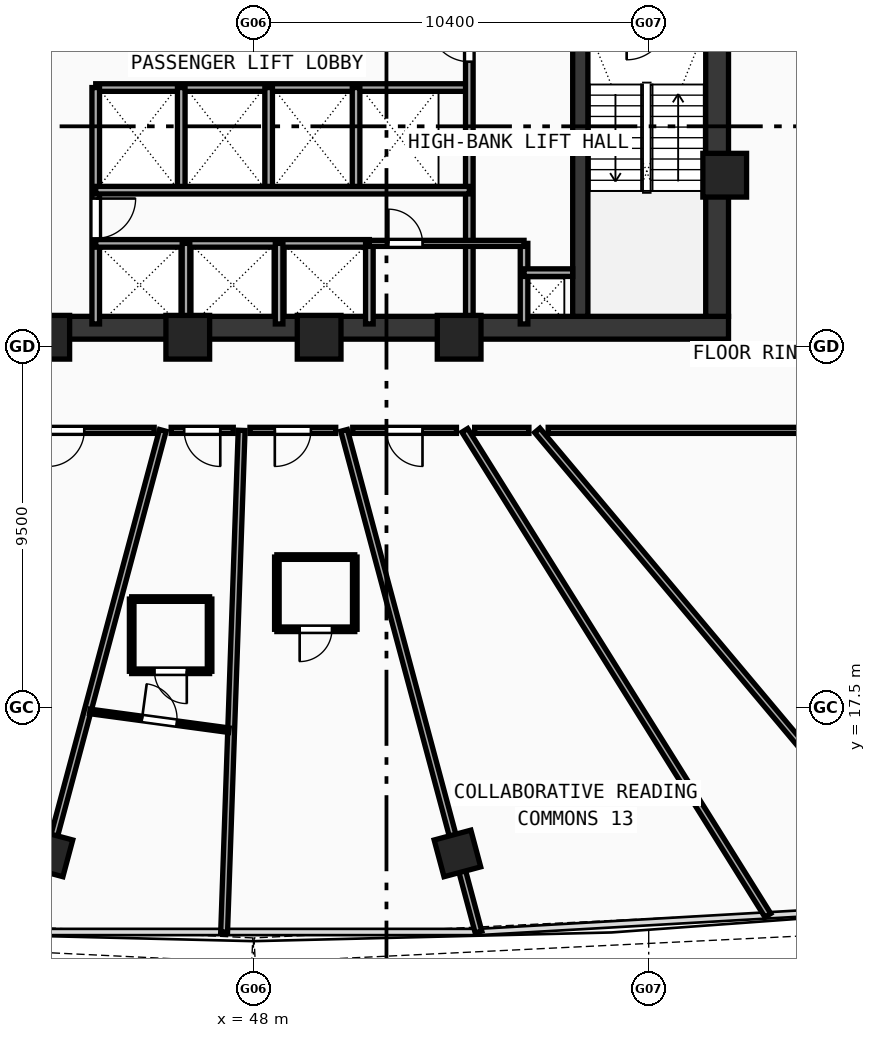
"""IFC4 building model, lengths in metres.
Left out: names, types, materials, properties, quantities, classifications, styles, units other than length and angle.
Written with IfcOpenShell. Run it as: python <this file> out.ifc"""

import sys

from ifc_helpers import new_model, si_unit, direction, frame, frame_2d, origin, origin_with_axes, origin_2d, place, context, subcontext, project, spatial, rectangle, hollow_rectangle, extrude, source, transform, mapped, element, fill, save


model = new_model("IFC4")
c1 = context("Model", 3, precision=1e-05, world=origin(), true_north=direction((0.0, 1.0)))
c2 = subcontext(c1, "Body", "Model", "MODEL_VIEW")
j1 = project(units=[si_unit("LENGTHUNIT", "METRE"), si_unit("PLANEANGLEUNIT", "RADIAN")], contexts=[c1])
p1 = place(None, origin())
s1 = spatial("IfcSite", under=j1, at=p1, CompositionType="ELEMENT")
p2 = place(p1, origin())
s2 = spatial("IfcBuilding", under=s1, at=p2, CompositionType="ELEMENT")
p3 = place(p2, frame((0.0, 0.0, 88.78)))
s3 = spatial("IfcBuildingStorey", under=s2, at=p3, CompositionType="ELEMENT", Elevation=88.78)
p4 = place(p3, frame((35.5, 27.5, 0.0), z_axis=(0.0, 0.0, 1.0), x_axis=(1.0, 0.0, 0.0)))
e1 = element("IfcWall", 1, at=p4, inside=s3, PredefinedType="SHEAR", context=c2, shape_type="SweptSolid", body=[
    extrude(rectangle(XDim=25.0, YDim=0.6, at=frame_2d((12.5, 0.0))), origin(), (0.0, 0.0, 1.0), 3.54),
])
p5 = place(p3, frame((60.2, 27.8, 0.0), z_axis=(0.0, 0.0, 1.0), x_axis=(0.0, 1.0, 0.0)))
e2 = element("IfcWall", 2, at=p5, inside=s3, PredefinedType="SHEAR", context=c2, shape_type="SweptSolid", body=[
    extrude(rectangle(XDim=12.1, YDim=0.6, at=frame_2d((6.05, 0.0))), origin(), (0.0, 0.0, 1.0), 3.54),
])
p6 = place(p3, frame((56.6, 27.8, 0.0), z_axis=(0.0, 0.0, 1.0), x_axis=(0.0, 1.0, 0.0)))
e3 = element("IfcWall", 3, at=p6, inside=s3, PredefinedType="SHEAR", context=c2, shape_type="SweptSolid", body=[
    extrude(rectangle(XDim=12.1, YDim=0.4, at=frame_2d((6.05, 0.0))), origin(), (0.0, 0.0, 1.0), 3.54),
])
p7 = place(p6, frame((9.95, 0.0, 0.0)))
e4 = element("IfcOpeningElement", 4, at=p7, cuts=e3, PredefinedType="OPENING", context=c2, shape_type="SweptSolid", body=[
    extrude(rectangle(XDim=1.1, YDim=2.1, at=frame_2d((0.55, 1.05))), frame((0.0, 0.21, 0.0), z_axis=(0.0, -1.0, 0.0), x_axis=(1.0, 0.0, 0.0)), (0.0, 0.0, 1.0), 0.42),
])
m1 = source(origin(), c2, "Body", "SweptSolid", [
    extrude(hollow_rectangle(XDim=1.15, YDim=1.15, WallThickness=0.048, at=origin_2d()), origin(), (0.0, 0.0, 1.0), 3.8),
])
for number, where, z_axis, x_axis in (
    (5, (42.588, 27.25, -0.26), (0.0, 0.0, 1.0), (1.0, 0.0, 0.0)),
    (6, (46.272, 27.25, -0.26), (0.0, 0.0, 1.0), (1.0, 0.0, 0.0)),
    (7, (49.729, 27.25, -0.26), (0.0, 0.0, 1.0), (1.0, 0.0, 0.0)),
    (8, (53.412, 27.25, -0.26), (0.0, 0.0, 1.0), (1.0, 0.0, 0.0)),
    (9, (60.4, 31.513, -0.26), (0.0, 0.0, 1.0), (1.0, 0.0, 0.0)),
):
    element("IfcColumn", number, at=place(p3, frame(where, z_axis=z_axis, x_axis=x_axis)), inside=s3, PredefinedType="COLUMN", context=c2, shape_type="MappedRepresentation", body=[
        mapped(m1, transform((0.0, 0.0, 0.0), scale=1.0)),
    ])
m2 = source(origin(), c2, "Body", "SweptSolid", [
    extrude(hollow_rectangle(XDim=1.0, YDim=1.0, WallThickness=0.042, at=origin_2d()), origin(), (0.0, 0.0, 1.0), 3.8),
])
for number, where, z_axis, x_axis in (
    (10, (42.633, 13.668, -0.26), (0.0, 0.0, 1.0), (0.966, -0.259, 0.0)),
    (11, (53.367, 13.668, -0.26), (0.0, 0.0, 1.0), (0.966, 0.259, 0.0)),
):
    element("IfcColumn", number, at=place(p3, frame(where, z_axis=z_axis, x_axis=x_axis)), inside=s3, PredefinedType="COLUMN", context=c2, shape_type="MappedRepresentation", body=[
        mapped(m2, transform((0.0, 0.0, 0.0), scale=1.0)),
    ])
p8 = place(p3, frame((43.85, 33.82, 0.0), z_axis=(0.0, 0.0, 1.0), x_axis=(1.0, 0.0, 0.0)))
e12 = element("IfcWall", 12, at=p8, inside=s3, PredefinedType="SOLIDWALL", context=c2, shape_type="SweptSolid", body=[
    extrude(rectangle(XDim=9.83, YDim=0.2, at=frame_2d((4.915, 0.0))), origin(), (0.0, 0.0, 1.0), 3.54),
])
p9 = place(p3, frame((43.85, 27.6, 0.0), z_axis=(0.0, 0.0, 1.0), x_axis=(0.0, 1.0, 0.0)))
e13 = element("IfcWall", 13, at=p9, inside=s3, PredefinedType="SOLIDWALL", context=c2, shape_type="SweptSolid", body=[
    extrude(rectangle(XDim=6.22, YDim=0.2, at=frame_2d((3.11, 0.0))), origin(), (0.0, 0.0, 1.0), 3.54),
])
p10 = place(p9, frame((2.25, 0.0, 0.0)))
e14 = element("IfcOpeningElement", 14, at=p10, cuts=e13, PredefinedType="OPENING", context=c2, shape_type="SweptSolid", body=[
    extrude(rectangle(XDim=1.05, YDim=2.1, at=frame_2d((0.525, 1.05))), frame((0.0, 0.11, 0.0), z_axis=(0.0, -1.0, 0.0), x_axis=(1.0, 0.0, 0.0)), (0.0, 0.0, 1.0), 0.22),
])
p11 = place(p3, frame((53.68, 27.6, 0.0), z_axis=(0.0, 0.0, 1.0), x_axis=(0.0, 1.0, 0.0)))
e15 = element("IfcWall", 15, at=p11, inside=s3, PredefinedType="SOLIDWALL", context=c2, shape_type="SweptSolid", body=[
    extrude(rectangle(XDim=9.05, YDim=0.2, at=frame_2d((4.525, 0.0))), origin(), (0.0, 0.0, 1.0), 3.54),
])
p12 = place(p11, frame((6.9, 0.0, 0.0)))
e16 = element("IfcOpeningElement", 16, at=p12, cuts=e15, PredefinedType="OPENING", context=c2, shape_type="SweptSolid", body=[
    extrude(rectangle(XDim=1.05, YDim=2.1, at=frame_2d((0.525, 1.05))), frame((0.0, 0.11, 0.0), z_axis=(0.0, -1.0, 0.0), x_axis=(1.0, 0.0, 0.0)), (0.0, 0.0, 1.0), 0.22),
])
for number, where, z_axis, x_axis in (
    (17, (46.1, 31.12, 0.0), (0.0, 0.0, 1.0), (0.0, 1.0, 0.0)),
    (18, (48.4, 31.12, 0.0), (0.0, 0.0, 1.0), (0.0, 1.0, 0.0)),
    (19, (50.7, 31.12, 0.0), (0.0, 0.0, 1.0), (0.0, 1.0, 0.0)),
):
    element("IfcWall", number, at=place(p3, frame(where, z_axis=z_axis, x_axis=x_axis)), inside=s3, PredefinedType="SOLIDWALL", context=c2, shape_type="SweptSolid", body=[
        extrude(rectangle(XDim=2.7, YDim=0.2, at=frame_2d((1.35, 0.0))), origin(), (0.0, 0.0, 1.0), 3.54),
    ])
p13 = place(p3, frame((43.85, 29.72, 0.0), z_axis=(0.0, 0.0, 1.0), x_axis=(1.0, 0.0, 0.0)))
e20 = element("IfcWall", 20, at=p13, inside=s3, PredefinedType="SOLIDWALL", context=c2, shape_type="SweptSolid", body=[
    extrude(rectangle(XDim=7.2, YDim=0.2, at=frame_2d((3.6, 0.0))), origin(), (0.0, 0.0, 1.0), 3.54),
])
p14 = place(p3, frame((51.05, 27.6, 0.0), z_axis=(0.0, 0.0, 1.0), x_axis=(0.0, 1.0, 0.0)))
e21 = element("IfcWall", 21, at=p14, inside=s3, PredefinedType="SOLIDWALL", context=c2, shape_type="SweptSolid", body=[
    extrude(rectangle(XDim=2.12, YDim=0.2, at=frame_2d((1.06, 0.0))), origin(), (0.0, 0.0, 1.0), 3.54),
])
p15 = place(p3, frame((43.85, 31.12, 0.0), z_axis=(0.0, 0.0, 1.0), x_axis=(1.0, 0.0, 0.0)))
e22 = element("IfcWall", 22, at=p15, inside=s3, PredefinedType="SOLIDWALL", context=c2, shape_type="SweptSolid", body=[
    extrude(rectangle(XDim=9.83, YDim=0.2, at=frame_2d((4.915, 0.0))), origin(), (0.0, 0.0, 1.0), 3.54),
])
for number, where, z_axis, x_axis in (
    (23, (46.225, 27.6, 0.0), (0.0, 0.0, 1.0), (0.0, 1.0, 0.0)),
    (24, (48.675, 27.6, 0.0), (0.0, 0.0, 1.0), (0.0, 1.0, 0.0)),
    (25, (55.12, 27.6, 0.0), (0.0, 0.0, 1.0), (0.0, 1.0, 0.0)),
):
    element("IfcWall", number, at=place(p3, frame(where, z_axis=z_axis, x_axis=x_axis)), inside=s3, PredefinedType="SOLIDWALL", context=c2, shape_type="SweptSolid", body=[
        extrude(rectangle(XDim=2.12, YDim=0.2, at=frame_2d((1.06, 0.0))), origin(), (0.0, 0.0, 1.0), 3.54),
    ])
p16 = place(p3, frame((55.12, 28.95, 0.0), z_axis=(0.0, 0.0, 1.0), x_axis=(1.0, 0.0, 0.0)))
e26 = element("IfcWall", 26, at=p16, inside=s3, PredefinedType="SOLIDWALL", context=c2, shape_type="SweptSolid", body=[
    extrude(rectangle(XDim=1.28, YDim=0.2, at=frame_2d((0.64, 0.0))), origin(), (0.0, 0.0, 1.0), 3.54),
])
p17 = place(p3, frame((51.05, 29.72, 0.0), z_axis=(0.0, 0.0, 1.0), x_axis=(1.0, 0.0, 0.0)))
e27 = element("IfcWall", 27, at=p17, inside=s3, PredefinedType="PARTITIONING", context=c2, shape_type="SweptSolid", body=[
    extrude(rectangle(XDim=4.07, YDim=0.16, at=frame_2d((2.035, 0.0))), origin(), (0.0, 0.0, 1.0), 3.54),
])
p18 = place(p17, frame((0.5, 0.0, 0.0)))
e28 = element("IfcOpeningElement", 28, at=p18, cuts=e27, PredefinedType="OPENING", context=c2, shape_type="SweptSolid", body=[
    extrude(rectangle(XDim=0.9, YDim=2.1, at=frame_2d((0.45, 1.05))), frame((0.0, 0.09, 0.0), z_axis=(0.0, -1.0, 0.0), x_axis=(1.0, 0.0, 0.0)), (0.0, 0.0, 1.0), 0.18),
])
p19 = place(p3, frame((45.615, 24.8, 0.0), z_axis=(0.0, 0.0, 1.0), x_axis=(-0.25881675816, -0.965926439071, 0.0)))
e29 = element("IfcWall", 29, at=p19, inside=s3, PredefinedType="PARTITIONING", context=c2, shape_type="SweptSolid", body=[
    extrude(rectangle(XDim=13.665, YDim=0.18, at=frame_2d((6.832, 0.0))), origin(), (0.0, 0.0, 1.0), 2.84),
])
p20 = place(p3, frame((47.689, 24.8, 0.0), z_axis=(0.0, 0.0, 1.0), x_axis=(-0.034900944933, -0.999390776445, 0.0)))
e30 = element("IfcWall", 30, at=p20, inside=s3, PredefinedType="PARTITIONING", context=c2, shape_type="SweptSolid", body=[
    extrude(rectangle(XDim=13.207, YDim=0.18, at=frame_2d((6.604, 0.0))), origin(), (0.0, 0.0, 1.0), 2.84),
])
p21 = place(p3, frame((50.385, 24.8, 0.0), z_axis=(0.0, 0.0, 1.0), x_axis=(0.25881675816, -0.965926439071, 0.0)))
e31 = element("IfcWall", 31, at=p21, inside=s3, PredefinedType="PARTITIONING", context=c2, shape_type="SweptSolid", body=[
    extrude(rectangle(XDim=13.665, YDim=0.18, at=frame_2d((6.832, 0.0))), origin(), (0.0, 0.0, 1.0), 2.84),
])
p22 = place(p3, frame((53.561, 24.8, 0.0), z_axis=(0.0, 0.0, 1.0), x_axis=(0.529927477017, -0.848042964184, 0.0)))
e32 = element("IfcWall", 32, at=p22, inside=s3, PredefinedType="PARTITIONING", context=c2, shape_type="SweptSolid", body=[
    extrude(rectangle(XDim=15.048, YDim=0.18, at=frame_2d((7.524, 0.0))), origin(), (0.0, 0.0, 1.0), 2.84),
])
p23 = place(p3, frame((55.468, 24.8, 0.0), z_axis=(0.0, 0.0, 1.0), x_axis=(0.642790086939, -0.76604236445, 0.0)))
e33 = element("IfcWall", 33, at=p23, inside=s3, PredefinedType="PARTITIONING", context=c2, shape_type="SweptSolid", body=[
    extrude(rectangle(XDim=16.326, YDim=0.18, at=frame_2d((8.163, 0.0))), origin(), (0.0, 0.0, 1.0), 2.84),
])
p24 = place(p3, frame((64.2, 24.8, 0.0), z_axis=(0.0, 0.0, 1.0), x_axis=(-1.0, 0.0, 0.0)))
e34 = element("IfcWall", 34, at=p24, inside=s3, PredefinedType="PARTITIONING", context=c2, shape_type="SweptSolid", body=[
    extrude(rectangle(XDim=8.445, YDim=0.16, at=frame_2d((4.222, 0.0))), origin(), (0.0, 0.0, 1.0), 3.14),
])
p25 = place(p3, frame((55.248, 24.8, 0.0), z_axis=(0.0, 0.0, 1.0), x_axis=(-1.0, 0.0, 0.0)))
e35 = element("IfcWall", 35, at=p25, inside=s3, PredefinedType="PARTITIONING", context=c2, shape_type="SweptSolid", body=[
    extrude(rectangle(XDim=1.427, YDim=0.16, at=frame_2d((0.714, 0.0))), origin(), (0.0, 0.0, 1.0), 2.84),
])
p26 = place(p3, frame((53.342, 24.8, 0.0), z_axis=(0.0, 0.0, 1.0), x_axis=(-1.0, 0.0, 0.0)))
e36 = element("IfcWall", 36, at=p26, inside=s3, PredefinedType="PARTITIONING", context=c2, shape_type="SweptSolid", body=[
    extrude(rectangle(XDim=2.729, YDim=0.16, at=frame_2d((1.365, 0.0))), origin(), (0.0, 0.0, 1.0), 3.54),
])
p27 = place(p26, frame((0.894, 0.0, 0.0)))
e37 = element("IfcOpeningElement", 37, at=p27, cuts=e36, PredefinedType="OPENING", context=c2, shape_type="SweptSolid", body=[
    extrude(rectangle(XDim=0.95, YDim=2.1, at=frame_2d((0.475, 1.05))), frame((0.0, 0.09, 0.0), z_axis=(0.0, -1.0, 0.0), x_axis=(1.0, 0.0, 0.0)), (0.0, 0.0, 1.0), 0.18),
])
p28 = place(p3, frame((50.165, 24.8, 0.0), z_axis=(0.0, 0.0, 1.0), x_axis=(-1.0, 0.0, 0.0)))
e38 = element("IfcWall", 38, at=p28, inside=s3, PredefinedType="PARTITIONING", context=c2, shape_type="SweptSolid", body=[
    extrude(rectangle(XDim=2.256, YDim=0.16, at=frame_2d((1.128, 0.0))), origin(), (0.0, 0.0, 1.0), 3.54),
])
p29 = place(p28, frame((0.653, 0.0, 0.0)))
e39 = element("IfcOpeningElement", 39, at=p29, cuts=e38, PredefinedType="OPENING", context=c2, shape_type="SweptSolid", body=[
    extrude(rectangle(XDim=0.95, YDim=2.1, at=frame_2d((0.475, 1.05))), frame((0.0, 0.09, 0.0), z_axis=(0.0, -1.0, 0.0), x_axis=(1.0, 0.0, 0.0)), (0.0, 0.0, 1.0), 0.18),
])
p30 = place(p3, frame((47.469, 24.8, 0.0), z_axis=(0.0, 0.0, 1.0), x_axis=(-1.0, 0.0, 0.0)))
e40 = element("IfcWall", 40, at=p30, inside=s3, PredefinedType="PARTITIONING", context=c2, shape_type="SweptSolid", body=[
    extrude(rectangle(XDim=1.634, YDim=0.16, at=frame_2d((0.817, 0.0))), origin(), (0.0, 0.0, 1.0), 3.54),
])
p31 = place(p30, frame((0.342, 0.0, 0.0)))
e41 = element("IfcOpeningElement", 41, at=p31, cuts=e40, PredefinedType="OPENING", context=c2, shape_type="SweptSolid", body=[
    extrude(rectangle(XDim=0.95, YDim=2.1, at=frame_2d((0.475, 1.05))), frame((0.0, 0.09, 0.0), z_axis=(0.0, -1.0, 0.0), x_axis=(1.0, 0.0, 0.0)), (0.0, 0.0, 1.0), 0.18),
])
p32 = place(p3, frame((45.387, 24.8, 0.0), z_axis=(0.0, 0.0, 1.0), x_axis=(-1.0, 0.0, 0.0)))
e42 = element("IfcWall", 42, at=p32, inside=s3, PredefinedType="PARTITIONING", context=c2, shape_type="SweptSolid", body=[
    extrude(rectangle(XDim=4.635, YDim=0.16, at=frame_2d((2.318, 0.0))), origin(), (0.0, 0.0, 1.0), 2.84),
])
p33 = place(p32, frame((1.839, 0.0, 0.0)))
e43 = element("IfcOpeningElement", 43, at=p33, cuts=e42, PredefinedType="OPENING", context=c2, shape_type="SweptSolid", body=[
    extrude(rectangle(XDim=0.95, YDim=2.1, at=frame_2d((0.475, 1.05))), frame((0.0, 0.09, 0.0), z_axis=(0.0, -1.0, 0.0), x_axis=(1.0, 0.0, 0.0)), (0.0, 0.0, 1.0), 0.18),
])
p34 = place(p3, frame((44.796, 18.461, 0.0), z_axis=(0.0, 0.0, 1.0), x_axis=(1.0, 0.0, 0.0)))
e44 = element("IfcWall", 44, at=p34, inside=s3, PredefinedType="PARTITIONING", context=c2, shape_type="SweptSolid", body=[
    extrude(rectangle(XDim=2.05, YDim=0.12, at=frame_2d((1.025, 0.0))), origin(), (0.0, 0.0, 1.0), 3.54),
])
p35 = place(p34, frame((0.6, 0.0, 0.0)))
e45 = element("IfcOpeningElement", 45, at=p35, cuts=e44, PredefinedType="OPENING", context=c2, shape_type="SweptSolid", body=[
    extrude(rectangle(XDim=0.85, YDim=2.1, at=frame_2d((0.425, 1.05))), frame((0.0, 0.07, 0.0), z_axis=(0.0, -1.0, 0.0), x_axis=(1.0, 0.0, 0.0)), (0.0, 0.0, 1.0), 0.14),
])
p36 = place(p3, frame((46.846, 18.461, 0.0), z_axis=(0.0, 0.0, 1.0), x_axis=(0.0, 1.0, 0.0)))
e46 = element("IfcWall", 46, at=p36, inside=s3, PredefinedType="PARTITIONING", context=c2, shape_type="SweptSolid", body=[
    extrude(rectangle(XDim=1.9, YDim=0.12, at=frame_2d((0.95, 0.0))), origin(), (0.0, 0.0, 1.0), 3.54),
])
p37 = place(p3, frame((46.846, 20.361, 0.0), z_axis=(0.0, 0.0, 1.0), x_axis=(-1.0, 0.0, 0.0)))
e47 = element("IfcWall", 47, at=p37, inside=s3, PredefinedType="PARTITIONING", context=c2, shape_type="SweptSolid", body=[
    extrude(rectangle(XDim=2.05, YDim=0.12, at=frame_2d((1.025, 0.0))), origin(), (0.0, 0.0, 1.0), 3.54),
])
p38 = place(p3, frame((44.796, 20.361, 0.0), z_axis=(0.0, 0.0, 1.0), x_axis=(0.0, -1.0, 0.0)))
e48 = element("IfcWall", 48, at=p38, inside=s3, PredefinedType="PARTITIONING", context=c2, shape_type="SweptSolid", body=[
    extrude(rectangle(XDim=1.9, YDim=0.12, at=frame_2d((0.95, 0.0))), origin(), (0.0, 0.0, 1.0), 3.54),
])
p39 = place(p3, frame((43.696, 17.405, 0.0), z_axis=(0.0, 0.0, 1.0), x_axis=(0.99099005791, -0.133935451329, 0.0)))
e49 = element("IfcWall", 49, at=p39, inside=s3, PredefinedType="PARTITIONING", context=c2, shape_type="SweptSolid", body=[
    extrude(rectangle(XDim=3.691, YDim=0.12, at=frame_2d((1.846, 0.0))), origin(), (0.0, 0.0, 1.0), 2.84),
])
p40 = place(p39, frame((1.385, 0.0, 0.0)))
e50 = element("IfcOpeningElement", 50, at=p40, cuts=e49, PredefinedType="OPENING", context=c2, shape_type="SweptSolid", body=[
    extrude(rectangle(XDim=0.92, YDim=2.1, at=frame_2d((0.46, 1.05))), frame((0.0, 0.07, 0.0), z_axis=(0.0, -1.0, 0.0), x_axis=(1.0, 0.0, 0.0)), (0.0, 0.0, 1.0), 0.14),
])
p41 = place(p3, frame((48.616, 19.566, 0.0), z_axis=(0.0, 0.0, 1.0), x_axis=(1.0, 0.0, 0.0)))
e51 = element("IfcWall", 51, at=p41, inside=s3, PredefinedType="PARTITIONING", context=c2, shape_type="SweptSolid", body=[
    extrude(rectangle(XDim=2.05, YDim=0.12, at=frame_2d((1.025, 0.0))), origin(), (0.0, 0.0, 1.0), 3.54),
])
p42 = place(p41, frame((0.6, 0.0, 0.0)))
e52 = element("IfcOpeningElement", 52, at=p42, cuts=e51, PredefinedType="OPENING", context=c2, shape_type="SweptSolid", body=[
    extrude(rectangle(XDim=0.85, YDim=2.1, at=frame_2d((0.425, 1.05))), frame((0.0, 0.07, 0.0), z_axis=(0.0, -1.0, 0.0), x_axis=(1.0, 0.0, 0.0)), (0.0, 0.0, 1.0), 0.14),
])
p43 = place(p3, frame((50.666, 19.566, 0.0), z_axis=(0.0, 0.0, 1.0), x_axis=(0.0, 1.0, 0.0)))
e53 = element("IfcWall", 53, at=p43, inside=s3, PredefinedType="PARTITIONING", context=c2, shape_type="SweptSolid", body=[
    extrude(rectangle(XDim=1.9, YDim=0.12, at=frame_2d((0.95, 0.0))), origin(), (0.0, 0.0, 1.0), 3.54),
])
p44 = place(p3, frame((50.666, 21.466, 0.0), z_axis=(0.0, 0.0, 1.0), x_axis=(-1.0, 0.0, 0.0)))
e54 = element("IfcWall", 54, at=p44, inside=s3, PredefinedType="PARTITIONING", context=c2, shape_type="SweptSolid", body=[
    extrude(rectangle(XDim=2.05, YDim=0.12, at=frame_2d((1.025, 0.0))), origin(), (0.0, 0.0, 1.0), 3.54),
])
p45 = place(p3, frame((48.616, 21.466, 0.0), z_axis=(0.0, 0.0, 1.0), x_axis=(0.0, -1.0, 0.0)))
e55 = element("IfcWall", 55, at=p45, inside=s3, PredefinedType="PARTITIONING", context=c2, shape_type="SweptSolid", body=[
    extrude(rectangle(XDim=1.9, YDim=0.12, at=frame_2d((0.95, 0.0))), origin(), (0.0, 0.0, 1.0), 3.54),
])
m3 = source(origin(), c2, "Body", "SweptSolid", [
    extrude(rectangle(XDim=1.05, YDim=2.1, at=frame_2d((0.525, 1.05))), frame((0.0, 0.025, 0.0), z_axis=(0.0, -1.0, 0.0), x_axis=(1.0, 0.0, 0.0)), (0.0, 0.0, 1.0), 0.05),
])
p46 = place(p10, frame((1.05, 0.0, 0.0), z_axis=(0.0, 0.0, 1.0), x_axis=(-1.0, 0.0, 0.0)))
e56 = element("IfcDoor", 56, at=p46, inside=s3, OperationType="SINGLE_SWING_LEFT", PredefinedType="DOOR", context=c2, shape_type="MappedRepresentation", body=[
    mapped(m3, transform((0.0, 0.0, 0.0), scale=1.0)),
])
fill(e14, e56)
p47 = place(p12, origin_with_axes())
e57 = element("IfcDoor", 57, at=p47, inside=s3, OperationType="SINGLE_SWING_RIGHT", PredefinedType="DOOR", context=c2, shape_type="MappedRepresentation", body=[
    mapped(m3, transform((0.0, 0.0, 0.0), scale=1.0)),
])
fill(e16, e57)
m4 = source(origin(), c2, "Body", "SweptSolid", [
    extrude(rectangle(XDim=0.9, YDim=2.1, at=frame_2d((0.45, 1.05))), frame((0.0, 0.025, 0.0), z_axis=(0.0, -1.0, 0.0), x_axis=(1.0, 0.0, 0.0)), (0.0, 0.0, 1.0), 0.05),
])
p48 = place(p18, origin_with_axes())
e58 = element("IfcDoor", 58, at=p48, inside=s3, OperationType="SINGLE_SWING_LEFT", PredefinedType="DOOR", context=c2, shape_type="MappedRepresentation", body=[
    mapped(m4, transform((0.0, 0.0, 0.0), scale=1.0)),
])
fill(e28, e58)
m5 = source(origin(), c2, "Body", "SweptSolid", [
    extrude(rectangle(XDim=0.95, YDim=2.1, at=frame_2d((0.475, 1.05))), frame((0.0, 0.025, 0.0), z_axis=(0.0, -1.0, 0.0), x_axis=(1.0, 0.0, 0.0)), (0.0, 0.0, 1.0), 0.05),
])
p49 = place(p33, origin_with_axes())
e59 = element("IfcDoor", 59, at=p49, inside=s3, OperationType="SINGLE_SWING_RIGHT", PredefinedType="DOOR", context=c2, shape_type="MappedRepresentation", body=[
    mapped(m5, transform((0.0, 0.0, 0.0), scale=1.0)),
])
fill(e43, e59)
p50 = place(p31, origin_with_axes())
e60 = element("IfcDoor", 60, at=p50, inside=s3, OperationType="SINGLE_SWING_LEFT", PredefinedType="DOOR", context=c2, shape_type="MappedRepresentation", body=[
    mapped(m5, transform((0.0, 0.0, 0.0), scale=1.0)),
])
fill(e41, e60)
m6 = source(origin(), c2, "Body", "SweptSolid", [
    extrude(rectangle(XDim=0.85, YDim=2.1, at=frame_2d((0.425, 1.05))), frame((0.0, 0.025, 0.0), z_axis=(0.0, -1.0, 0.0), x_axis=(1.0, 0.0, 0.0)), (0.0, 0.0, 1.0), 0.05),
])
p51 = place(p35, frame((0.85, 0.0, 0.0), z_axis=(0.0, 0.0, 1.0), x_axis=(-1.0, 0.0, 0.0)))
e61 = element("IfcDoor", 61, at=p51, inside=s3, OperationType="SINGLE_SWING_LEFT", PredefinedType="DOOR", context=c2, shape_type="MappedRepresentation", body=[
    mapped(m6, transform((0.0, 0.0, 0.0), scale=1.0)),
])
fill(e45, e61)
m7 = source(origin(), c2, "Body", "SweptSolid", [
    extrude(rectangle(XDim=0.92, YDim=2.1, at=frame_2d((0.46, 1.05))), frame((0.0, 0.025, 0.0), z_axis=(0.0, -1.0, 0.0), x_axis=(1.0, 0.0, 0.0)), (0.0, 0.0, 1.0), 0.05),
])
p52 = place(p40, origin_with_axes())
e62 = element("IfcDoor", 62, at=p52, inside=s3, OperationType="SINGLE_SWING_LEFT", PredefinedType="DOOR", context=c2, shape_type="MappedRepresentation", body=[
    mapped(m7, transform((0.0, 0.0, 0.0), scale=1.0)),
])
fill(e50, e62)
p53 = place(p29, origin_with_axes())
e63 = element("IfcDoor", 63, at=p53, inside=s3, OperationType="SINGLE_SWING_RIGHT", PredefinedType="DOOR", context=c2, shape_type="MappedRepresentation", body=[
    mapped(m5, transform((0.0, 0.0, 0.0), scale=1.0)),
])
fill(e39, e63)
p54 = place(p42, frame((0.85, 0.0, 0.0), z_axis=(0.0, 0.0, 1.0), x_axis=(-1.0, 0.0, 0.0)))
e64 = element("IfcDoor", 64, at=p54, inside=s3, OperationType="SINGLE_SWING_RIGHT", PredefinedType="DOOR", context=c2, shape_type="MappedRepresentation", body=[
    mapped(m6, transform((0.0, 0.0, 0.0), scale=1.0)),
])
fill(e52, e64)
p55 = place(p27, origin_with_axes())
e65 = element("IfcDoor", 65, at=p55, inside=s3, OperationType="SINGLE_SWING_LEFT", PredefinedType="DOOR", context=c2, shape_type="MappedRepresentation", body=[
    mapped(m5, transform((0.0, 0.0, 0.0), scale=1.0)),
])
fill(e37, e65)
save(model, sys.argv[1])
